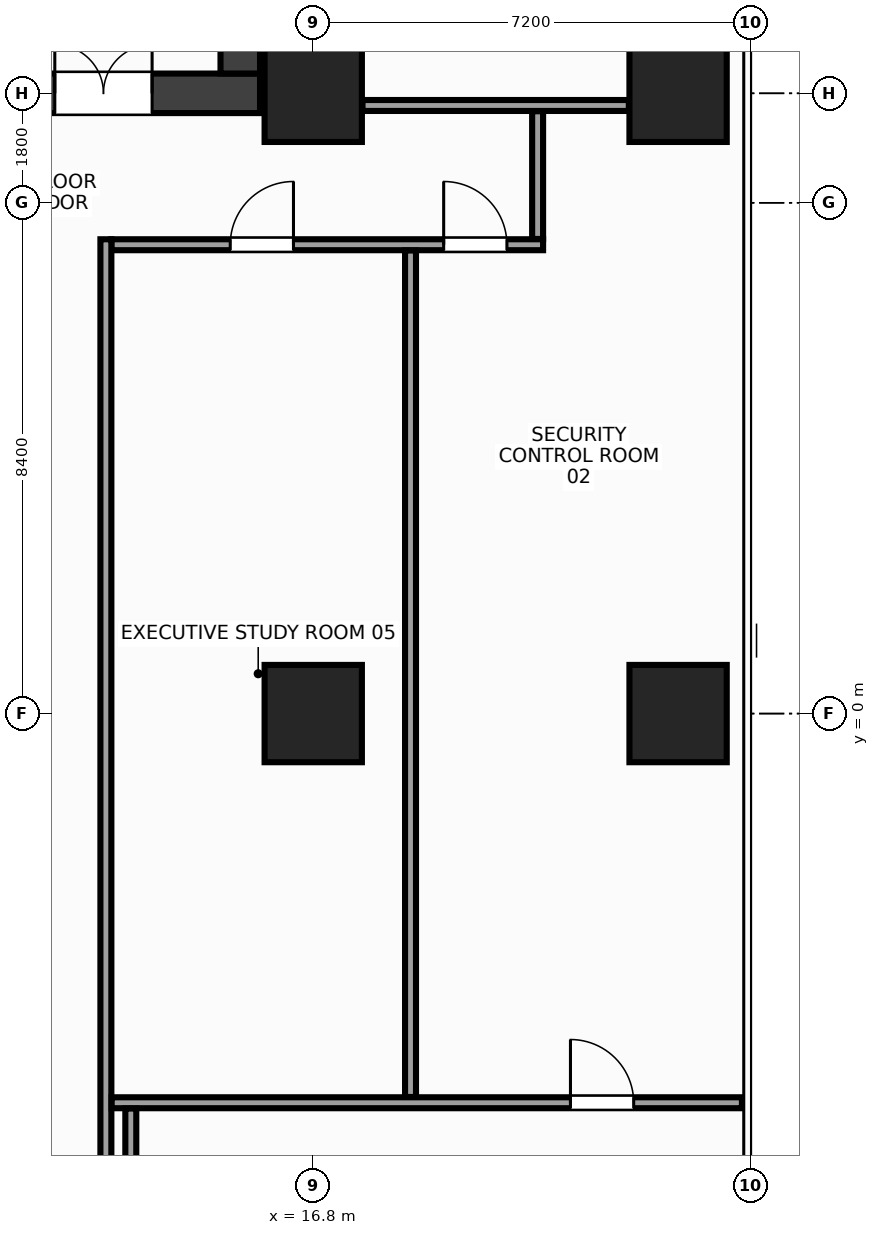
"""IFC4 building model, lengths in metres.
Left out: names, types, materials, properties, quantities, classifications, styles, units other than length and angle.
Written with IfcOpenShell. Run it as: python <this file> out.ifc"""

import sys

from ifc_helpers import new_model, si_unit, direction, frame, frame_2d, origin, origin_2d, place, context, subcontext, project, spatial, rectangle, extrude, source, transform, mapped, element, fill, save


model = new_model("IFC4")
c1 = context("Model", 3, precision=1e-05, world=origin(), true_north=direction((0.0, 1.0)))
c2 = subcontext(c1, "Body", "Model", "MODEL_VIEW")
j1 = project(units=[si_unit("LENGTHUNIT", "METRE"), si_unit("PLANEANGLEUNIT", "RADIAN")], contexts=[c1])
p1 = place(None, origin())
s1 = spatial("IfcSite", under=j1, at=p1, CompositionType="ELEMENT")
p2 = place(p1, origin())
s2 = spatial("IfcBuilding", under=s1, at=p2, CompositionType="ELEMENT")
p3 = place(p2, frame((0.0, 0.0, 171.2)))
s3 = spatial("IfcBuildingStorey", under=s2, at=p3, CompositionType="ELEMENT", Elevation=171.2)
m1 = source(origin(), c2, "Body", "SweptSolid", [
    extrude(rectangle(XDim=31.85, YDim=0.65, at=frame_2d((15.925, 0.0))), origin(), (0.0, 0.0, 1.0), 3.6),
])
p4 = place(p3, frame((-15.925, 10.2, 0.0), z_axis=(0.0, 0.0, 1.0), x_axis=(1.0, 0.0, 0.0)))
e1 = element("IfcWall", 1, at=p4, inside=s3, PredefinedType="SHEAR", context=c2, shape_type="MappedRepresentation", body=[
    mapped(m1, transform((0.0, 0.0, 0.0), x_axis=(1.0, 0.0, 0.0), y_axis=(0.0, 1.0, 0.0), z_axis=(0.0, 0.0, 1.0), scale=1.0)),
])
p5 = place(p4, frame((1.775, 0.0, 0.0)))
e2 = element("IfcOpeningElement", 2, at=p5, cuts=e1, PredefinedType="OPENING", context=c2, shape_type="SweptSolid", body=[
    extrude(rectangle(XDim=1.6, YDim=2.15, at=frame_2d((0.8, 1.075))), frame((0.0, 0.337, 0.0), z_axis=(0.0, -1.0, 0.0), x_axis=(1.0, 0.0, 0.0)), (0.0, 0.0, 1.0), 0.674),
])
p6 = place(p4, frame((28.475, 0.0, 0.0)))
e3 = element("IfcOpeningElement", 3, at=p6, cuts=e1, PredefinedType="OPENING", context=c2, shape_type="SweptSolid", body=[
    extrude(rectangle(XDim=1.6, YDim=2.15, at=frame_2d((0.8, 1.075))), frame((0.0, 0.337, 0.0), z_axis=(0.0, -1.0, 0.0), x_axis=(1.0, 0.0, 0.0)), (0.0, 0.0, 1.0), 0.674),
])
p7 = place(p4, frame((15.175, 0.0, 0.0)))
e4 = element("IfcOpeningElement", 4, at=p7, cuts=e1, PredefinedType="OPENING", context=c2, shape_type="SweptSolid", body=[
    extrude(rectangle(XDim=1.5, YDim=2.2, at=frame_2d((0.75, 1.1))), frame((0.0, 0.337, 0.0), z_axis=(0.0, -1.0, 0.0), x_axis=(1.0, 0.0, 0.0)), (0.0, 0.0, 1.0), 0.674),
])
m2 = source(origin(), c2, "Body", "SweptSolid", [
    extrude(rectangle(XDim=12.95, YDim=0.65, at=frame_2d((6.475, 0.0))), origin(), (0.0, 0.0, 1.0), 3.6),
])
p8 = place(p3, frame((15.6, 10.525, 0.0), z_axis=(0.0, 0.0, 1.0), x_axis=(0.0, 1.0, 0.0)))
e5 = element("IfcWall", 5, at=p8, inside=s3, PredefinedType="SHEAR", context=c2, shape_type="MappedRepresentation", body=[
    mapped(m2, transform((0.0, 0.0, 0.0), x_axis=(1.0, 0.0, 0.0), y_axis=(0.0, 1.0, 0.0), z_axis=(0.0, 0.0, 1.0), scale=1.0)),
])
m3 = source(origin(), c2, "Body", "SweptSolid", [
    extrude(rectangle(XDim=1.6, YDim=1.6, at=origin_2d()), origin(), (0.0, 0.0, 1.0), 3.6),
])
for number, where, z_axis, x_axis in (
    (6, (16.8, 0.0, 0.0), (0.0, 0.0, 1.0), (1.0, 0.0, 0.0)),
    (7, (16.8, 10.2, 0.0), (0.0, 0.0, 1.0), (1.0, 0.0, 0.0)),
    (8, (22.8, 0.0, 0.0), (0.0, 0.0, 1.0), (1.0, 0.0, 0.0)),
    (9, (22.8, 10.2, 0.0), (0.0, 0.0, 1.0), (1.0, 0.0, 0.0)),
):
    element("IfcColumn", number, at=place(p3, frame(where, z_axis=z_axis, x_axis=x_axis)), inside=s3, PredefinedType="COLUMN", context=c2, shape_type="MappedRepresentation", body=[
        mapped(m3, transform((0.0, 0.0, 0.0), x_axis=(1.0, 0.0, 0.0), y_axis=(0.0, 1.0, 0.0), z_axis=(0.0, 0.0, 1.0), scale=1.0)),
    ])
m4 = source(origin(), c2, "Body", "SweptSolid", [
    extrude(rectangle(XDim=4.38, YDim=0.18, at=frame_2d((2.19, 0.0))), origin(), (0.0, 0.0, 1.0), 2.915),
])
p9 = place(p3, frame((17.61, 10.0, 0.0), z_axis=(0.0, 0.0, 1.0), x_axis=(1.0, 0.0, 0.0)))
e10 = element("IfcWall", 10, at=p9, inside=s3, PredefinedType="PARTITIONING", context=c2, shape_type="MappedRepresentation", body=[
    mapped(m4, transform((0.0, 0.0, 0.0), x_axis=(1.0, 0.0, 0.0), y_axis=(0.0, 1.0, 0.0), z_axis=(0.0, 0.0, 1.0), scale=1.0)),
])
m5 = source(origin(), c2, "Body", "SweptSolid", [
    extrude(rectangle(XDim=7.1, YDim=0.18, at=frame_2d((3.55, 0.0))), origin(), (0.0, 0.0, 1.0), 2.765),
])
p10 = place(p3, frame((13.48, 7.71, 0.0), z_axis=(0.0, 0.0, 1.0), x_axis=(1.0, 0.0, 0.0)))
e11 = element("IfcWall", 11, at=p10, inside=s3, PredefinedType="PARTITIONING", context=c2, shape_type="MappedRepresentation", body=[
    mapped(m5, transform((0.0, 0.0, 0.0), x_axis=(1.0, 0.0, 0.0), y_axis=(0.0, 1.0, 0.0), z_axis=(0.0, 0.0, 1.0), scale=1.0)),
])
p11 = place(p10, frame((5.465, 0.0, 0.0)))
e12 = element("IfcOpeningElement", 12, at=p11, cuts=e11, PredefinedType="OPENING", context=c2, shape_type="SweptSolid", body=[
    extrude(rectangle(XDim=1.04, YDim=2.2, at=frame_2d((0.52, 1.1))), frame((0.0, 0.102, 0.0), z_axis=(0.0, -1.0, 0.0), x_axis=(1.0, 0.0, 0.0)), (0.0, 0.0, 1.0), 0.204),
])
p12 = place(p10, frame((1.955, 0.0, 0.0)))
e13 = element("IfcOpeningElement", 13, at=p12, cuts=e11, PredefinedType="OPENING", context=c2, shape_type="SweptSolid", body=[
    extrude(rectangle(XDim=1.04, YDim=2.2, at=frame_2d((0.52, 1.1))), frame((0.0, 0.102, 0.0), z_axis=(0.0, -1.0, 0.0), x_axis=(1.0, 0.0, 0.0)), (0.0, 0.0, 1.0), 0.204),
])
m6 = source(origin(), c2, "Body", "SweptSolid", [
    extrude(rectangle(XDim=2.1, YDim=0.18, at=frame_2d((1.05, 0.0))), origin(), (0.0, 0.0, 1.0), 3.38),
])
p13 = place(p3, frame((20.49, 7.805, 0.0), z_axis=(0.0, 0.0, 1.0), x_axis=(0.0, 1.0, 0.0)))
e14 = element("IfcWall", 14, at=p13, inside=s3, PredefinedType="PARTITIONING", context=c2, shape_type="MappedRepresentation", body=[
    mapped(m6, transform((0.0, 0.0, 0.0), x_axis=(1.0, 0.0, 0.0), y_axis=(0.0, 1.0, 0.0), z_axis=(0.0, 0.0, 1.0), scale=1.0)),
])
m7 = source(origin(), c2, "Body", "SweptSolid", [
    extrude(rectangle(XDim=22.595, YDim=0.18, at=frame_2d((11.297, 0.0))), origin(), (0.0, 0.0, 1.0), 2.665),
])
p14 = place(p3, frame((13.39, -14.795, 0.0), z_axis=(0.0, 0.0, 1.0), x_axis=(0.0, 1.0, 0.0)))
e15 = element("IfcWall", 15, at=p14, inside=s3, PredefinedType="PARTITIONING", context=c2, shape_type="MappedRepresentation", body=[
    mapped(m7, transform((0.0, 0.0, 0.0), x_axis=(1.0, 0.0, 0.0), y_axis=(0.0, 1.0, 0.0), z_axis=(0.0, 0.0, 1.0), scale=1.0)),
])
m8 = source(origin(), c2, "Body", "SweptSolid", [
    extrude(rectangle(XDim=10.365, YDim=0.18, at=frame_2d((5.183, 0.0))), origin(), (0.0, 0.0, 1.0), 2.765),
])
p15 = place(p3, frame((13.485, -6.4, 0.0), z_axis=(0.0, 0.0, 1.0), x_axis=(1.0, 0.0, 0.0)))
e16 = element("IfcWall", 16, at=p15, inside=s3, PredefinedType="PARTITIONING", context=c2, shape_type="MappedRepresentation", body=[
    mapped(m8, transform((0.0, 0.0, 0.0), x_axis=(1.0, 0.0, 0.0), y_axis=(0.0, 1.0, 0.0), z_axis=(0.0, 0.0, 1.0), scale=1.0)),
])
p16 = place(p15, frame((7.545, 0.0, 0.0)))
e17 = element("IfcOpeningElement", 17, at=p16, cuts=e16, PredefinedType="OPENING", context=c2, shape_type="SweptSolid", body=[
    extrude(rectangle(XDim=1.04, YDim=2.2, at=frame_2d((0.52, 1.1))), frame((0.0, 0.102, 0.0), z_axis=(0.0, -1.0, 0.0), x_axis=(1.0, 0.0, 0.0)), (0.0, 0.0, 1.0), 0.204),
])
m9 = source(origin(), c2, "Body", "SweptSolid", [
    extrude(rectangle(XDim=13.92, YDim=0.18, at=frame_2d((6.96, 0.0))), origin(), (0.0, 0.0, 1.0), 2.915),
])
p17 = place(p3, frame((18.4, -6.305, 0.0), z_axis=(0.0, 0.0, 1.0), x_axis=(0.0, 1.0, 0.0)))
e18 = element("IfcWall", 18, at=p17, inside=s3, PredefinedType="PARTITIONING", context=c2, shape_type="MappedRepresentation", body=[
    mapped(m9, transform((0.0, 0.0, 0.0), x_axis=(1.0, 0.0, 0.0), y_axis=(0.0, 1.0, 0.0), z_axis=(0.0, 0.0, 1.0), scale=1.0)),
])
m10 = source(origin(), c2, "Body", "SweptSolid", [
    extrude(rectangle(XDim=16.155, YDim=0.18, at=frame_2d((8.077, 0.0))), origin(), (0.0, 0.0, 1.0), 2.915),
])
p18 = place(p3, frame((13.8, -22.65, 0.0), z_axis=(0.0, 0.0, 1.0), x_axis=(0.0, 1.0, 0.0)))
e19 = element("IfcWall", 19, at=p18, inside=s3, PredefinedType="PARTITIONING", context=c2, shape_type="MappedRepresentation", body=[
    mapped(m10, transform((0.0, 0.0, 0.0), x_axis=(1.0, 0.0, 0.0), y_axis=(0.0, 1.0, 0.0), z_axis=(0.0, 0.0, 1.0), scale=1.0)),
])
m11 = source(origin(), c2, "Body", "SweptSolid", [
    extrude(rectangle(XDim=1.6, YDim=2.15, at=frame_2d((0.8, 1.075))), frame((0.0, 0.025, 0.0), z_axis=(0.0, -1.0, 0.0), x_axis=(1.0, 0.0, 0.0)), (0.0, 0.0, 1.0), 0.05),
])
p19 = place(p6, origin())
e20 = element("IfcDoor", 20, at=p19, inside=s3, OperationType="DOUBLE_DOOR_SINGLE_SWING", PredefinedType="DOOR", context=c2, shape_type="MappedRepresentation", body=[
    mapped(m11, transform((0.0, 0.0, 0.0), x_axis=(1.0, 0.0, 0.0), y_axis=(0.0, 1.0, 0.0), z_axis=(0.0, 0.0, 1.0), scale=1.0)),
])
fill(e3, e20)
m12 = source(origin(), c2, "Body", "SweptSolid", [
    extrude(rectangle(XDim=1.04, YDim=2.2, at=frame_2d((0.52, 1.1))), frame((0.0, 0.025, 0.0), z_axis=(0.0, -1.0, 0.0), x_axis=(1.0, 0.0, 0.0)), (0.0, 0.0, 1.0), 0.05),
])
p20 = place(p11, origin())
e21 = element("IfcDoor", 21, at=p20, inside=s3, OperationType="SINGLE_SWING_LEFT", PredefinedType="DOOR", context=c2, shape_type="MappedRepresentation", body=[
    mapped(m12, transform((0.0, 0.0, 0.0), x_axis=(1.0, 0.0, 0.0), y_axis=(0.0, 1.0, 0.0), z_axis=(0.0, 0.0, 1.0), scale=1.0)),
])
fill(e12, e21)
p21 = place(p12, origin())
e22 = element("IfcDoor", 22, at=p21, inside=s3, OperationType="SINGLE_SWING_RIGHT", PredefinedType="DOOR", context=c2, shape_type="MappedRepresentation", body=[
    mapped(m12, transform((0.0, 0.0, 0.0), x_axis=(1.0, 0.0, 0.0), y_axis=(0.0, 1.0, 0.0), z_axis=(0.0, 0.0, 1.0), scale=1.0)),
])
fill(e13, e22)
p22 = place(p16, origin())
e23 = element("IfcDoor", 23, at=p22, inside=s3, OperationType="SINGLE_SWING_LEFT", PredefinedType="DOOR", context=c2, shape_type="MappedRepresentation", body=[
    mapped(m12, transform((0.0, 0.0, 0.0), x_axis=(1.0, 0.0, 0.0), y_axis=(0.0, 1.0, 0.0), z_axis=(0.0, 0.0, 1.0), scale=1.0)),
])
fill(e17, e23)
save(model, sys.argv[1])
